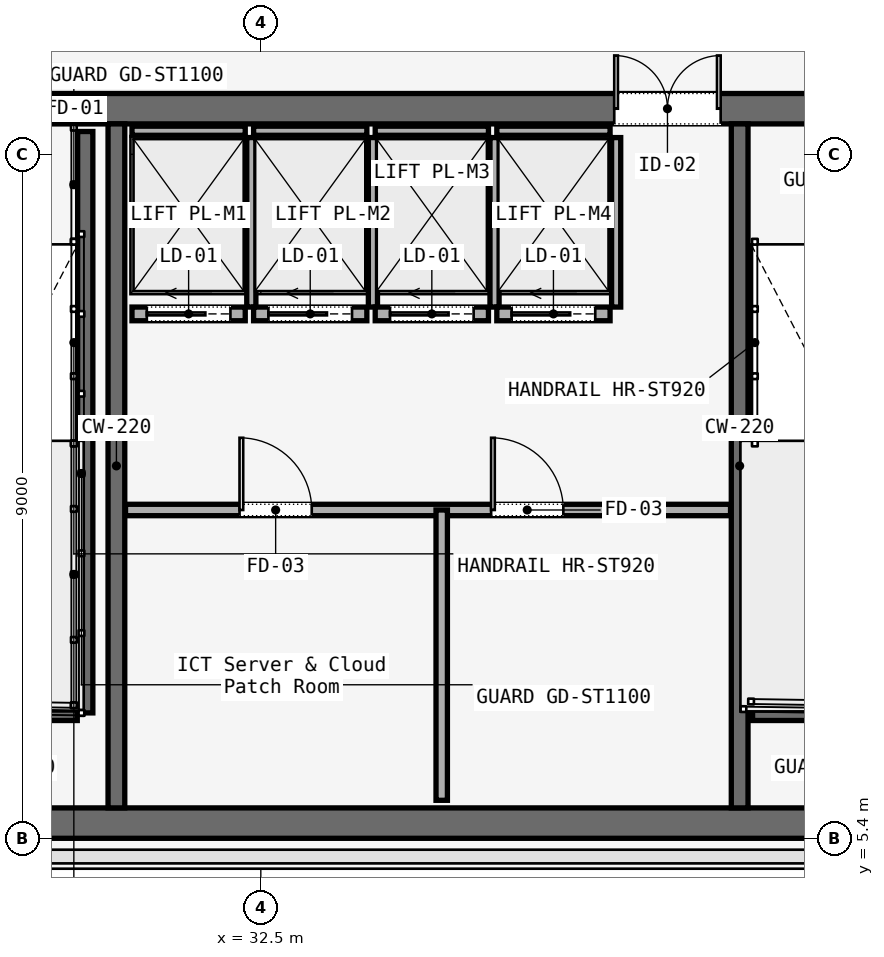
"""IFC4 building model, lengths in metres.
Left out: names, types, materials, properties, quantities, classifications, styles, units other than length and angle.
Written with IfcOpenShell. Run it as: python <this file> out.ifc"""

import sys

from ifc_helpers import new_model, si_unit, direction, frame, frame_2d, origin, place, context, subcontext, project, spatial, rectangle, extrude, element, fill, save


model = new_model("IFC4")
c1 = context("Model", 3, precision=1e-05, world=origin(), true_north=direction((0.0, 1.0)))
c2 = subcontext(c1, "Body", "Model", "MODEL_VIEW")
j1 = project(units=[si_unit("LENGTHUNIT", "METRE"), si_unit("PLANEANGLEUNIT", "RADIAN")], contexts=[c1])
p1 = place(None, origin())
s1 = spatial("IfcSite", under=j1, at=p1, CompositionType="ELEMENT")
p2 = place(p1, origin())
s2 = spatial("IfcBuilding", under=s1, at=p2, CompositionType="ELEMENT")
p3 = place(p2, frame((0.0, 0.0, 161.2)))
s3 = spatial("IfcBuildingStorey", under=s2, at=p3, CompositionType="ELEMENT", Elevation=161.2)
p4 = place(p3, frame((26.45, 15.0, 0.0), z_axis=(0.0, 0.0, 1.0), x_axis=(1.0, 0.0, 0.0)))
e1 = element("IfcWall", 1, at=p4, inside=s3, PredefinedType="SOLIDWALL", context=c2, shape_type="SweptSolid", body=[
    extrude(rectangle(XDim=31.1, YDim=0.4, at=frame_2d((15.55, 0.0))), origin(), (0.0, 0.0, 1.0), 3.58),
])
p5 = place(p4, frame((1.65, 0.0, 0.0)))
e2 = element("IfcOpeningElement", 2, at=p5, cuts=e1, PredefinedType="OPENING", context=c2, shape_type="SweptSolid", body=[
    extrude(rectangle(XDim=1.1, YDim=2.2, at=frame_2d((0.55, 1.1))), frame((0.0, 0.2, 0.0), z_axis=(0.0, -1.0, 0.0), x_axis=(1.0, 0.0, 0.0)), (0.0, 0.0, 1.0), 0.4),
])
p6 = place(p4, frame((13.65, 0.0, 0.0)))
e3 = element("IfcOpeningElement", 3, at=p6, cuts=e1, PredefinedType="OPENING", context=c2, shape_type="SweptSolid", body=[
    extrude(rectangle(XDim=1.1, YDim=2.2, at=frame_2d((0.55, 1.1))), frame((0.0, 0.2, 0.0), z_axis=(0.0, -1.0, 0.0), x_axis=(1.0, 0.0, 0.0)), (0.0, 0.0, 1.0), 0.4),
])
p7 = place(p4, frame((25.55, 0.0, 0.0)))
e4 = element("IfcOpeningElement", 4, at=p7, cuts=e1, PredefinedType="OPENING", context=c2, shape_type="SweptSolid", body=[
    extrude(rectangle(XDim=1.1, YDim=2.2, at=frame_2d((0.55, 1.1))), frame((0.0, 0.2, 0.0), z_axis=(0.0, -1.0, 0.0), x_axis=(1.0, 0.0, 0.0)), (0.0, 0.0, 1.0), 0.4),
])
p8 = place(p4, frame((10.7, 0.0, 0.0)))
e5 = element("IfcOpeningElement", 5, at=p8, cuts=e1, PredefinedType="OPENING", context=c2, shape_type="SweptSolid", body=[
    extrude(rectangle(XDim=1.4, YDim=2.2, at=frame_2d((0.7, 1.1))), frame((0.0, 0.2, 0.0), z_axis=(0.0, -1.0, 0.0), x_axis=(1.0, 0.0, 0.0)), (0.0, 0.0, 1.0), 0.4),
])
p9 = place(p4, frame((19.35, 0.0, 0.0)))
e6 = element("IfcOpeningElement", 6, at=p9, cuts=e1, PredefinedType="OPENING", context=c2, shape_type="SweptSolid", body=[
    extrude(rectangle(XDim=1.1, YDim=2.2, at=frame_2d((0.55, 1.1))), frame((0.0, 0.2, 0.0), z_axis=(0.0, -1.0, 0.0), x_axis=(1.0, 0.0, 0.0)), (0.0, 0.0, 1.0), 0.4),
])
p10 = place(p4, frame((21.4, 0.0, 0.0)))
e7 = element("IfcOpeningElement", 7, at=p10, cuts=e1, PredefinedType="OPENING", context=c2, shape_type="SweptSolid", body=[
    extrude(rectangle(XDim=0.9, YDim=2.1, at=frame_2d((0.45, 1.05))), frame((0.0, 0.2, 0.0), z_axis=(0.0, -1.0, 0.0), x_axis=(1.0, 0.0, 0.0)), (0.0, 0.0, 1.0), 0.4),
])
p11 = place(p4, frame((23.35, 0.0, 0.0)))
e8 = element("IfcOpeningElement", 8, at=p11, cuts=e1, PredefinedType="OPENING", context=c2, shape_type="SweptSolid", body=[
    extrude(rectangle(XDim=1.3, YDim=2.3, at=frame_2d((0.65, 1.15))), frame((0.0, 0.2, 0.0), z_axis=(0.0, -1.0, 0.0), x_axis=(1.0, 0.0, 0.0)), (0.0, 0.0, 1.0), 0.4),
])
p12 = place(p3, frame((26.45, 5.6, 0.0), z_axis=(0.0, 0.0, 1.0), x_axis=(1.0, 0.0, 0.0)))
e9 = element("IfcWall", 9, at=p12, inside=s3, PredefinedType="SOLIDWALL", context=c2, shape_type="SweptSolid", body=[
    extrude(rectangle(XDim=31.1, YDim=0.4, at=frame_2d((15.55, 0.0))), origin(), (0.0, 0.0, 1.0), 3.58),
])
for number, where, z_axis, x_axis in (
    (10, (30.6, 5.8, 0.0), (0.0, 0.0, 1.0), (0.0, 1.0, 0.0)),
    (11, (38.8, 5.8, 0.0), (0.0, 0.0, 1.0), (0.0, 1.0, 0.0)),
):
    element("IfcWall", number, at=place(p3, frame(where, z_axis=z_axis, x_axis=x_axis)), inside=s3, PredefinedType="SOLIDWALL", context=c2, shape_type="SweptSolid", body=[
        extrude(rectangle(XDim=9.0, YDim=0.22, at=frame_2d((4.5, 0.0))), origin(), (0.0, 0.0, 1.0), 3.58),
    ])
p13 = place(p3, frame((30.19, 14.7, 0.0), z_axis=(0.0, 0.0, 1.0), x_axis=(0.0, -1.0, 0.0)))
e12 = element("IfcWall", 12, at=p13, inside=s3, PredefinedType="SOLIDWALL", context=c2, shape_type="SweptSolid", body=[
    extrude(rectangle(XDim=7.65, YDim=0.2, at=frame_2d((3.825, 0.0))), origin(), (0.0, 0.0, 1.0), 3.8),
])
for number, where, z_axis, x_axis in (
    (13, (26.97, 7.05, 0.0), (0.0, 0.0, 1.0), (1.0, 0.0, 0.0)),
    (14, (38.97, 7.05, 0.0), (0.0, 0.0, 1.0), (1.0, 0.0, 0.0)),
):
    element("IfcWall", number, at=place(p3, frame(where, z_axis=z_axis, x_axis=x_axis)), inside=s3, PredefinedType="SOLIDWALL", context=c2, shape_type="SweptSolid", body=[
        extrude(rectangle(XDim=3.115, YDim=0.2, at=frame_2d((1.558, 0.0))), origin(), (0.0, 0.0, 1.0), 3.8),
    ])
p14 = place(p3, frame((30.72, 9.72, 0.0), z_axis=(0.0, 0.0, 1.0), x_axis=(1.0, 0.0, 0.0)))
e15 = element("IfcWall", 15, at=p14, inside=s3, PredefinedType="PARTITIONING", context=c2, shape_type="SweptSolid", body=[
    extrude(rectangle(XDim=7.96, YDim=0.15, at=frame_2d((3.98, 0.0))), origin(), (0.0, 0.0, 1.0), 3.01),
])
p15 = place(p14, frame((1.5, 0.0, 0.0)))
e16 = element("IfcOpeningElement", 16, at=p15, cuts=e15, PredefinedType="OPENING", context=c2, shape_type="SweptSolid", body=[
    extrude(rectangle(XDim=0.95, YDim=2.2, at=frame_2d((0.475, 1.1))), frame((0.0, 0.075, 0.0), z_axis=(0.0, -1.0, 0.0), x_axis=(1.0, 0.0, 0.0)), (0.0, 0.0, 1.0), 0.15),
])
p16 = place(p14, frame((4.81, 0.0, 0.0)))
e17 = element("IfcOpeningElement", 17, at=p16, cuts=e15, PredefinedType="OPENING", context=c2, shape_type="SweptSolid", body=[
    extrude(rectangle(XDim=0.95, YDim=2.2, at=frame_2d((0.475, 1.1))), frame((0.0, 0.075, 0.0), z_axis=(0.0, -1.0, 0.0), x_axis=(1.0, 0.0, 0.0)), (0.0, 0.0, 1.0), 0.15),
])
p17 = place(p3, frame((34.88, 5.9, 0.0), z_axis=(0.0, 0.0, 1.0), x_axis=(0.0, 1.0, 0.0)))
e18 = element("IfcWall", 18, at=p17, inside=s3, PredefinedType="PARTITIONING", context=c2, shape_type="SweptSolid", body=[
    extrude(rectangle(XDim=3.82, YDim=0.15, at=frame_2d((1.91, 0.0))), origin(), (0.0, 0.0, 1.0), 3.01),
])
p18 = place(p3, frame((30.805, 12.3, 0.0), z_axis=(0.0, 0.0, 1.0), x_axis=(1.0, 0.0, 0.0)))
e19 = element("IfcWall", 19, at=p18, inside=s3, PredefinedType="SOLIDWALL", context=c2, shape_type="SweptSolid", body=[
    extrude(rectangle(XDim=1.49, YDim=0.18, at=frame_2d((0.745, 0.0))), origin(), (0.0, 0.0, 1.0), 3.01),
])
p19 = place(p18, frame((0.195, 0.0, 0.0)))
e20 = element("IfcOpeningElement", 20, at=p19, cuts=e19, PredefinedType="OPENING", context=c2, shape_type="SweptSolid", body=[
    extrude(rectangle(XDim=1.1, YDim=2.2, at=frame_2d((0.55, 1.1))), frame((0.0, 0.09, 0.0), z_axis=(0.0, -1.0, 0.0), x_axis=(1.0, 0.0, 0.0)), (0.0, 0.0, 1.0), 0.18),
])
p20 = place(p3, frame((30.805, 14.71, 0.0), z_axis=(0.0, 0.0, 1.0), x_axis=(1.0, 0.0, 0.0)))
e21 = element("IfcWall", 21, at=p20, inside=s3, PredefinedType="SOLIDWALL", context=c2, shape_type="SweptSolid", body=[
    extrude(rectangle(XDim=1.49, YDim=0.12, at=frame_2d((0.745, 0.0))), origin(), (0.0, 0.0, 1.0), 3.01),
])
p21 = place(p3, frame((32.375, 12.39, 0.0), z_axis=(0.0, 0.0, 1.0), x_axis=(0.0, 1.0, 0.0)))
e22 = element("IfcWall", 22, at=p21, inside=s3, PredefinedType="SOLIDWALL", context=c2, shape_type="SweptSolid", body=[
    extrude(rectangle(XDim=2.23, YDim=0.12, at=frame_2d((1.115, 0.0))), origin(), (0.0, 0.0, 1.0), 3.01),
])
p22 = place(p3, frame((32.405, 12.3, 0.0), z_axis=(0.0, 0.0, 1.0), x_axis=(1.0, 0.0, 0.0)))
e23 = element("IfcWall", 23, at=p22, inside=s3, PredefinedType="SOLIDWALL", context=c2, shape_type="SweptSolid", body=[
    extrude(rectangle(XDim=1.49, YDim=0.18, at=frame_2d((0.745, 0.0))), origin(), (0.0, 0.0, 1.0), 3.01),
])
p23 = place(p22, frame((0.195, 0.0, 0.0)))
e24 = element("IfcOpeningElement", 24, at=p23, cuts=e23, PredefinedType="OPENING", context=c2, shape_type="SweptSolid", body=[
    extrude(rectangle(XDim=1.1, YDim=2.2, at=frame_2d((0.55, 1.1))), frame((0.0, 0.09, 0.0), z_axis=(0.0, -1.0, 0.0), x_axis=(1.0, 0.0, 0.0)), (0.0, 0.0, 1.0), 0.18),
])
p24 = place(p3, frame((32.405, 14.71, 0.0), z_axis=(0.0, 0.0, 1.0), x_axis=(1.0, 0.0, 0.0)))
e25 = element("IfcWall", 25, at=p24, inside=s3, PredefinedType="SOLIDWALL", context=c2, shape_type="SweptSolid", body=[
    extrude(rectangle(XDim=1.49, YDim=0.12, at=frame_2d((0.745, 0.0))), origin(), (0.0, 0.0, 1.0), 3.01),
])
p25 = place(p3, frame((33.975, 12.39, 0.0), z_axis=(0.0, 0.0, 1.0), x_axis=(0.0, 1.0, 0.0)))
e26 = element("IfcWall", 26, at=p25, inside=s3, PredefinedType="SOLIDWALL", context=c2, shape_type="SweptSolid", body=[
    extrude(rectangle(XDim=2.23, YDim=0.12, at=frame_2d((1.115, 0.0))), origin(), (0.0, 0.0, 1.0), 3.01),
])
p26 = place(p3, frame((34.005, 12.3, 0.0), z_axis=(0.0, 0.0, 1.0), x_axis=(1.0, 0.0, 0.0)))
e27 = element("IfcWall", 27, at=p26, inside=s3, PredefinedType="SOLIDWALL", context=c2, shape_type="SweptSolid", body=[
    extrude(rectangle(XDim=1.49, YDim=0.18, at=frame_2d((0.745, 0.0))), origin(), (0.0, 0.0, 1.0), 3.01),
])
p27 = place(p26, frame((0.195, 0.0, 0.0)))
e28 = element("IfcOpeningElement", 28, at=p27, cuts=e27, PredefinedType="OPENING", context=c2, shape_type="SweptSolid", body=[
    extrude(rectangle(XDim=1.1, YDim=2.2, at=frame_2d((0.55, 1.1))), frame((0.0, 0.09, 0.0), z_axis=(0.0, -1.0, 0.0), x_axis=(1.0, 0.0, 0.0)), (0.0, 0.0, 1.0), 0.18),
])
p28 = place(p3, frame((34.005, 14.71, 0.0), z_axis=(0.0, 0.0, 1.0), x_axis=(1.0, 0.0, 0.0)))
e29 = element("IfcWall", 29, at=p28, inside=s3, PredefinedType="SOLIDWALL", context=c2, shape_type="SweptSolid", body=[
    extrude(rectangle(XDim=1.49, YDim=0.12, at=frame_2d((0.745, 0.0))), origin(), (0.0, 0.0, 1.0), 3.01),
])
p29 = place(p3, frame((35.575, 12.39, 0.0), z_axis=(0.0, 0.0, 1.0), x_axis=(0.0, 1.0, 0.0)))
e30 = element("IfcWall", 30, at=p29, inside=s3, PredefinedType="SOLIDWALL", context=c2, shape_type="SweptSolid", body=[
    extrude(rectangle(XDim=2.23, YDim=0.12, at=frame_2d((1.115, 0.0))), origin(), (0.0, 0.0, 1.0), 3.01),
])
p30 = place(p3, frame((35.605, 12.3, 0.0), z_axis=(0.0, 0.0, 1.0), x_axis=(1.0, 0.0, 0.0)))
e31 = element("IfcWall", 31, at=p30, inside=s3, PredefinedType="SOLIDWALL", context=c2, shape_type="SweptSolid", body=[
    extrude(rectangle(XDim=1.49, YDim=0.18, at=frame_2d((0.745, 0.0))), origin(), (0.0, 0.0, 1.0), 3.01),
])
p31 = place(p30, frame((0.195, 0.0, 0.0)))
e32 = element("IfcOpeningElement", 32, at=p31, cuts=e31, PredefinedType="OPENING", context=c2, shape_type="SweptSolid", body=[
    extrude(rectangle(XDim=1.1, YDim=2.2, at=frame_2d((0.55, 1.1))), frame((0.0, 0.09, 0.0), z_axis=(0.0, -1.0, 0.0), x_axis=(1.0, 0.0, 0.0)), (0.0, 0.0, 1.0), 0.18),
])
p32 = place(p3, frame((35.605, 14.71, 0.0), z_axis=(0.0, 0.0, 1.0), x_axis=(1.0, 0.0, 0.0)))
e33 = element("IfcWall", 33, at=p32, inside=s3, PredefinedType="SOLIDWALL", context=c2, shape_type="SweptSolid", body=[
    extrude(rectangle(XDim=1.49, YDim=0.12, at=frame_2d((0.745, 0.0))), origin(), (0.0, 0.0, 1.0), 3.01),
])
p33 = place(p3, frame((37.175, 12.39, 0.0), z_axis=(0.0, 0.0, 1.0), x_axis=(0.0, 1.0, 0.0)))
e34 = element("IfcWall", 34, at=p33, inside=s3, PredefinedType="SOLIDWALL", context=c2, shape_type="SweptSolid", body=[
    extrude(rectangle(XDim=2.23, YDim=0.12, at=frame_2d((1.115, 0.0))), origin(), (0.0, 0.0, 1.0), 3.01),
])
p34 = place(p8, origin())
e35 = element("IfcDoor", 35, at=p34, inside=s3, OperationType="DOUBLE_DOOR_SINGLE_SWING", PredefinedType="DOOR", context=c2, shape_type="SweptSolid", body=[
    extrude(rectangle(XDim=1.4, YDim=2.2, at=frame_2d((0.7, 1.1))), frame((0.0, 0.025, 0.0), z_axis=(0.0, -1.0, 0.0), x_axis=(1.0, 0.0, 0.0)), (0.0, 0.0, 1.0), 0.05),
])
fill(e5, e35)
p35 = place(p15, origin())
e36 = element("IfcDoor", 36, at=p35, inside=s3, OperationType="SINGLE_SWING_LEFT", PredefinedType="DOOR", context=c2, shape_type="SweptSolid", body=[
    extrude(rectangle(XDim=0.95, YDim=2.2, at=frame_2d((0.475, 1.1))), frame((0.0, 0.025, 0.0), z_axis=(0.0, -1.0, 0.0), x_axis=(1.0, 0.0, 0.0)), (0.0, 0.0, 1.0), 0.05),
])
fill(e16, e36)
p36 = place(p16, origin())
e37 = element("IfcDoor", 37, at=p36, inside=s3, OperationType="SINGLE_SWING_RIGHT", PredefinedType="DOOR", context=c2, shape_type="SweptSolid", body=[
    extrude(rectangle(XDim=0.95, YDim=2.2, at=frame_2d((0.475, 1.1))), frame((0.0, 0.025, 0.0), z_axis=(0.0, -1.0, 0.0), x_axis=(1.0, 0.0, 0.0)), (0.0, 0.0, 1.0), 0.05),
])
fill(e17, e37)
p37 = place(p19, origin())
e38 = element("IfcDoor", 38, at=p37, inside=s3, OperationType="SLIDING_TO_LEFT", PredefinedType="DOOR", context=c2, shape_type="SweptSolid", body=[
    extrude(rectangle(XDim=1.1, YDim=2.2, at=frame_2d((0.55, 1.1))), frame((0.0, 0.025, 0.0), z_axis=(0.0, -1.0, 0.0), x_axis=(1.0, 0.0, 0.0)), (0.0, 0.0, 1.0), 0.05),
])
fill(e20, e38)
p38 = place(p23, origin())
e39 = element("IfcDoor", 39, at=p38, inside=s3, OperationType="SLIDING_TO_LEFT", PredefinedType="DOOR", context=c2, shape_type="SweptSolid", body=[
    extrude(rectangle(XDim=1.1, YDim=2.2, at=frame_2d((0.55, 1.1))), frame((0.0, 0.025, 0.0), z_axis=(0.0, -1.0, 0.0), x_axis=(1.0, 0.0, 0.0)), (0.0, 0.0, 1.0), 0.05),
])
fill(e24, e39)
p39 = place(p27, origin())
e40 = element("IfcDoor", 40, at=p39, inside=s3, OperationType="SLIDING_TO_LEFT", PredefinedType="DOOR", context=c2, shape_type="SweptSolid", body=[
    extrude(rectangle(XDim=1.1, YDim=2.2, at=frame_2d((0.55, 1.1))), frame((0.0, 0.025, 0.0), z_axis=(0.0, -1.0, 0.0), x_axis=(1.0, 0.0, 0.0)), (0.0, 0.0, 1.0), 0.05),
])
fill(e28, e40)
p40 = place(p31, origin())
e41 = element("IfcDoor", 41, at=p40, inside=s3, OperationType="SLIDING_TO_LEFT", PredefinedType="DOOR", context=c2, shape_type="SweptSolid", body=[
    extrude(rectangle(XDim=1.1, YDim=2.2, at=frame_2d((0.55, 1.1))), frame((0.0, 0.025, 0.0), z_axis=(0.0, -1.0, 0.0), x_axis=(1.0, 0.0, 0.0)), (0.0, 0.0, 1.0), 0.05),
])
fill(e32, e41)
save(model, sys.argv[1])
